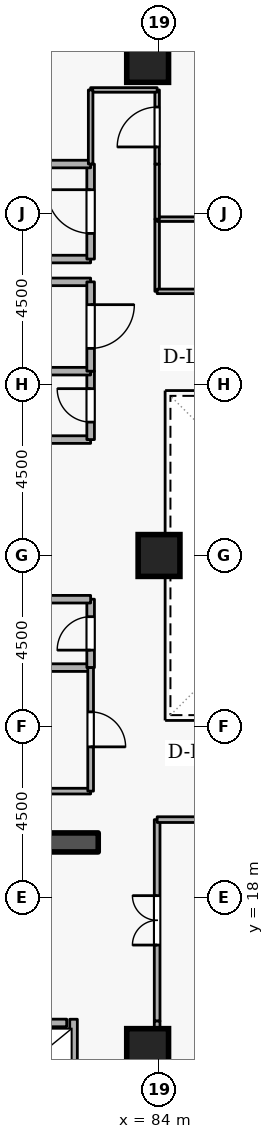
"""IFC4 building model, lengths in metres.
Left out: names, types, materials, properties, quantities, classifications, styles, units other than length and angle.
Written with IfcOpenShell. Run it as: python <this file> out.ifc"""

import sys

from ifc_helpers import new_model, si_unit, direction, frame, frame_2d, origin, origin_2d, place, context, subcontext, project, spatial, rectangle, extrude, element, fill, save


model = new_model("IFC4")
c1 = context("Model", 3, precision=1e-05, world=origin(), true_north=direction((0.0, 1.0)))
c2 = subcontext(c1, "Body", "Model", "MODEL_VIEW")
j1 = project(units=[si_unit("LENGTHUNIT", "METRE"), si_unit("PLANEANGLEUNIT", "RADIAN")], contexts=[c1])
p1 = place(None, origin())
s1 = spatial("IfcSite", under=j1, at=p1, CompositionType="ELEMENT")
p2 = place(p1, origin())
s2 = spatial("IfcBuilding", under=s1, at=p2, CompositionType="ELEMENT")
p3 = place(p2, frame((0.0, 0.0, 167.1)))
s3 = spatial("IfcBuildingStorey", under=s2, at=p3, CompositionType="ELEMENT", Elevation=167.1)
p4 = place(p3, frame((76.6, 19.45, 0.0), z_axis=(0.0, 0.0, 1.0), x_axis=(1.0, 0.0, 0.0)))
e1 = element("IfcWall", 1, at=p4, inside=s3, PredefinedType="SHEAR", context=c2, shape_type="SweptSolid", body=[
    extrude(rectangle(XDim=5.8, YDim=0.5, at=frame_2d((2.9, 0.0))), origin(), (0.0, 0.0, 1.0), 3.6),
])
for number, where, z_axis, x_axis in (
    (2, (83.7, 14.0, 0.0), (0.0, 0.0, 1.0), (1.0, 0.0, 0.0)),
    (3, (83.7, 40.0, 0.0), (0.0, 0.0, 1.0), (1.0, 0.0, 0.0)),
    (4, (84.0, 27.0, 0.0), (0.0, 0.0, 1.0), (1.0, 0.0, 0.0)),
):
    element("IfcColumn", number, at=place(p3, frame(where, z_axis=z_axis, x_axis=x_axis)), inside=s3, PredefinedType="COLUMN", context=c2, shape_type="SweptSolid", body=[
        extrude(rectangle(XDim=1.1, YDim=1.1, at=origin_2d()), origin(), (0.0, 0.0, 1.0), 3.6),
    ])
p5 = place(p3, frame((79.63, 14.7, 0.0), z_axis=(0.0, 0.0, 1.0), x_axis=(1.0, 0.0, 0.0)))
e5 = element("IfcWall", 5, at=p5, inside=s3, PredefinedType="STANDARD", context=c2, shape_type="SweptSolid", body=[
    extrude(rectangle(XDim=1.94, YDim=0.2, at=frame_2d((0.97, 0.0))), origin(), (0.0, 0.0, 1.0), 3.34),
])
p6 = place(p5, frame((0.46, 0.0, 0.0)))
e6 = element("IfcOpeningElement", 6, at=p6, cuts=e5, PredefinedType="OPENING", context=c2, shape_type="SweptSolid", body=[
    extrude(rectangle(XDim=1.02, YDim=2.06, at=frame_2d((0.51, 1.03))), frame((0.0, 0.11, 0.0), z_axis=(0.0, -1.0, 0.0), x_axis=(1.0, 0.0, 0.0)), (0.0, 0.0, 1.0), 0.22),
])
p7 = place(p3, frame((81.75, 12.612, 0.0), z_axis=(0.0, 0.0, 1.0), x_axis=(0.0, 1.0, 0.0)))
e7 = element("IfcWall", 7, at=p7, inside=s3, PredefinedType="STANDARD", context=c2, shape_type="SweptSolid", body=[
    extrude(rectangle(XDim=2.186, YDim=0.2, at=frame_2d((1.093, 0.0))), origin(), (0.0, 0.0, 1.0), 3.34),
])
p8 = place(p3, frame((79.9, 34.8, 0.0), z_axis=(0.0, 0.0, 1.0), x_axis=(1.0, 0.0, 0.0)))
e8 = element("IfcWall", 8, at=p8, inside=s3, PredefinedType="STANDARD", context=c2, shape_type="SweptSolid", body=[
    extrude(rectangle(XDim=2.3, YDim=0.2, at=frame_2d((1.15, 0.0))), origin(), (0.0, 0.0, 1.0), 2.545),
])
p9 = place(p3, frame((82.2, 34.8, 0.0), z_axis=(0.0, 0.0, 1.0), x_axis=(0.0, 1.0, 0.0)))
e9 = element("IfcWall", 9, at=p9, inside=s3, PredefinedType="STANDARD", context=c2, shape_type="SweptSolid", body=[
    extrude(rectangle(XDim=2.5, YDim=0.2, at=frame_2d((1.25, 0.0))), origin(), (0.0, 0.0, 1.0), 3.34),
])
p10 = place(p9, frame((0.675, 0.0, 0.0)))
e10 = element("IfcOpeningElement", 10, at=p10, cuts=e9, PredefinedType="OPENING", context=c2, shape_type="SweptSolid", body=[
    extrude(rectangle(XDim=1.15, YDim=2.1, at=frame_2d((0.575, 1.05))), frame((0.0, 0.11, 0.0), z_axis=(0.0, -1.0, 0.0), x_axis=(1.0, 0.0, 0.0)), (0.0, 0.0, 1.0), 0.22),
])
p11 = place(p3, frame((82.2, 37.3, 0.0), z_axis=(0.0, 0.0, 1.0), x_axis=(-1.0, 0.0, 0.0)))
e11 = element("IfcWall", 11, at=p11, inside=s3, PredefinedType="STANDARD", context=c2, shape_type="SweptSolid", body=[
    extrude(rectangle(XDim=5.7, YDim=0.2, at=frame_2d((2.85, 0.0))), origin(), (0.0, 0.0, 1.0), 3.34),
])
p12 = place(p3, frame((80.15, 24.05, 0.0), z_axis=(0.0, 0.0, 1.0), x_axis=(1.0, 0.0, 0.0)))
e12 = element("IfcWall", 12, at=p12, inside=s3, PredefinedType="STANDARD", context=c2, shape_type="SweptSolid", body=[
    extrude(rectangle(XDim=2.05, YDim=0.2, at=frame_2d((1.025, 0.0))), origin(), (0.0, 0.0, 1.0), 3.34),
])
p13 = place(p3, frame((82.2, 24.05, 0.0), z_axis=(0.0, 0.0, 1.0), x_axis=(0.0, 1.0, 0.0)))
e13 = element("IfcWall", 13, at=p13, inside=s3, PredefinedType="STANDARD", context=c2, shape_type="SweptSolid", body=[
    extrude(rectangle(XDim=1.8, YDim=0.2, at=frame_2d((0.9, 0.0))), origin(), (0.0, 0.0, 1.0), 3.34),
])
p14 = place(p13, frame((0.46, 0.0, 0.0)))
e14 = element("IfcOpeningElement", 14, at=p14, cuts=e13, PredefinedType="OPENING", context=c2, shape_type="SweptSolid", body=[
    extrude(rectangle(XDim=0.88, YDim=2.04, at=frame_2d((0.44, 1.02))), frame((0.0, 0.11, 0.0), z_axis=(0.0, -1.0, 0.0), x_axis=(1.0, 0.0, 0.0)), (0.0, 0.0, 1.0), 0.22),
])
for number, where, z_axis, x_axis in (
    (15, (82.2, 25.85, 0.0), (0.0, 0.0, 1.0), (-1.0, 0.0, 0.0)),
    (16, (80.15, 30.05, 0.0), (0.0, 0.0, 1.0), (1.0, 0.0, 0.0)),
):
    element("IfcWall", number, at=place(p3, frame(where, z_axis=z_axis, x_axis=x_axis)), inside=s3, PredefinedType="STANDARD", context=c2, shape_type="SweptSolid", body=[
        extrude(rectangle(XDim=2.05, YDim=0.2, at=frame_2d((1.025, 0.0))), origin(), (0.0, 0.0, 1.0), 3.34),
    ])
p15 = place(p3, frame((82.2, 30.05, 0.0), z_axis=(0.0, 0.0, 1.0), x_axis=(0.0, 1.0, 0.0)))
e17 = element("IfcWall", 17, at=p15, inside=s3, PredefinedType="STANDARD", context=c2, shape_type="SweptSolid", body=[
    extrude(rectangle(XDim=1.8, YDim=0.2, at=frame_2d((0.9, 0.0))), origin(), (0.0, 0.0, 1.0), 3.34),
])
p16 = place(p15, frame((0.46, 0.0, 0.0)))
e18 = element("IfcOpeningElement", 18, at=p16, cuts=e17, PredefinedType="OPENING", context=c2, shape_type="SweptSolid", body=[
    extrude(rectangle(XDim=0.88, YDim=2.04, at=frame_2d((0.44, 1.02))), frame((0.0, 0.11, 0.0), z_axis=(0.0, -1.0, 0.0), x_axis=(1.0, 0.0, 0.0)), (0.0, 0.0, 1.0), 0.22),
])
p17 = place(p3, frame((82.2, 31.85, 0.0), z_axis=(0.0, 0.0, 1.0), x_axis=(-1.0, 0.0, 0.0)))
e19 = element("IfcWall", 19, at=p17, inside=s3, PredefinedType="STANDARD", context=c2, shape_type="SweptSolid", body=[
    extrude(rectangle(XDim=2.05, YDim=0.2, at=frame_2d((1.025, 0.0))), origin(), (0.0, 0.0, 1.0), 3.34),
])
p18 = place(p3, frame((80.15, 34.2, 0.0), z_axis=(0.0, 0.0, 1.0), x_axis=(1.0, 0.0, 0.0)))
e20 = element("IfcWall", 20, at=p18, inside=s3, PredefinedType="STANDARD", context=c2, shape_type="SweptSolid", body=[
    extrude(rectangle(XDim=2.05, YDim=0.2, at=frame_2d((1.025, 0.0))), origin(), (0.0, 0.0, 1.0), 2.545),
])
p19 = place(p3, frame((82.2, 34.2, 0.0), z_axis=(0.0, 0.0, 1.0), x_axis=(0.0, -1.0, 0.0)))
e21 = element("IfcWall", 21, at=p19, inside=s3, PredefinedType="STANDARD", context=c2, shape_type="SweptSolid", body=[
    extrude(rectangle(XDim=2.35, YDim=0.2, at=frame_2d((1.175, 0.0))), origin(), (0.0, 0.0, 1.0), 3.34),
])
p20 = place(p19, frame((0.6, 0.0, 0.0)))
e22 = element("IfcOpeningElement", 22, at=p20, cuts=e21, PredefinedType="OPENING", context=c2, shape_type="SweptSolid", body=[
    extrude(rectangle(XDim=1.15, YDim=2.1, at=frame_2d((0.575, 1.05))), frame((0.0, 0.11, 0.0), z_axis=(0.0, -1.0, 0.0), x_axis=(1.0, 0.0, 0.0)), (0.0, 0.0, 1.0), 0.22),
])
p21 = place(p3, frame((82.2, 20.8, 0.0), z_axis=(0.0, 0.0, 1.0), x_axis=(-1.0, 0.0, 0.0)))
e23 = element("IfcWall", 23, at=p21, inside=s3, PredefinedType="PARTITIONING", context=c2, shape_type="SweptSolid", body=[
    extrude(rectangle(XDim=2.05, YDim=0.15, at=frame_2d((1.025, 0.0))), origin(), (0.0, 0.0, 1.0), 3.34),
])
p22 = place(p3, frame((82.2, 24.05, 0.0), z_axis=(0.0, 0.0, 1.0), x_axis=(0.0, -1.0, 0.0)))
e24 = element("IfcWall", 24, at=p22, inside=s3, PredefinedType="PARTITIONING", context=c2, shape_type="SweptSolid", body=[
    extrude(rectangle(XDim=3.25, YDim=0.15, at=frame_2d((1.625, 0.0))), origin(), (0.0, 0.0, 1.0), 3.34),
])
p23 = place(p22, frame((1.165, 0.0, 0.0)))
e25 = element("IfcOpeningElement", 25, at=p23, cuts=e24, PredefinedType="OPENING", context=c2, shape_type="SweptSolid", body=[
    extrude(rectangle(XDim=0.92, YDim=2.08, at=frame_2d((0.46, 1.04))), frame((0.0, 0.085, 0.0), z_axis=(0.0, -1.0, 0.0), x_axis=(1.0, 0.0, 0.0)), (0.0, 0.0, 1.0), 0.17),
])
p24 = place(p3, frame((83.95, 14.75, 0.0), z_axis=(0.0, 0.0, 1.0), x_axis=(0.0, 1.0, 0.0)))
e26 = element("IfcWall", 26, at=p24, inside=s3, PredefinedType="PARTITIONING", context=c2, shape_type="SweptSolid", body=[
    extrude(rectangle(XDim=5.3, YDim=0.15, at=frame_2d((2.65, 0.0))), origin(), (0.0, 0.0, 1.0), 3.34),
])
p25 = place(p24, frame((2.0, 0.0, 0.0)))
e27 = element("IfcOpeningElement", 27, at=p25, cuts=e26, PredefinedType="OPENING", context=c2, shape_type="SweptSolid", body=[
    extrude(rectangle(XDim=1.3, YDim=2.12, at=frame_2d((0.65, 1.06))), frame((0.0, 0.085, 0.0), z_axis=(0.0, -1.0, 0.0), x_axis=(1.0, 0.0, 0.0)), (0.0, 0.0, 1.0), 0.17),
])
p26 = place(p3, frame((83.95, 20.05, 0.0), z_axis=(0.0, 0.0, 1.0), x_axis=(1.0, 0.0, 0.0)))
e28 = element("IfcWall", 28, at=p26, inside=s3, PredefinedType="PARTITIONING", context=c2, shape_type="SweptSolid", body=[
    extrude(rectangle(XDim=2.25, YDim=0.15, at=frame_2d((1.125, 0.0))), origin(), (0.0, 0.0, 1.0), 3.34),
])
p27 = place(p3, frame((83.95, 12.4, 0.0), z_axis=(0.0, 0.0, 1.0), x_axis=(0.0, 1.0, 0.0)))
e29 = element("IfcWall", 29, at=p27, inside=s3, PredefinedType="PARTITIONING", context=c2, shape_type="SweptSolid", body=[
    extrude(rectangle(XDim=2.35, YDim=0.15, at=frame_2d((1.175, 0.0))), origin(), (0.0, 0.0, 1.0), 3.34),
])
p28 = place(p3, frame((83.95, 33.95, 0.0), z_axis=(0.0, 0.0, 1.0), x_axis=(0.0, 1.0, 0.0)))
e30 = element("IfcWall", 30, at=p28, inside=s3, PredefinedType="PARTITIONING", context=c2, shape_type="SweptSolid", body=[
    extrude(rectangle(XDim=1.9, YDim=0.12, at=frame_2d((0.95, 0.0))), origin(), (0.0, 0.0, 1.0), 3.34),
])
p29 = place(p3, frame((83.95, 35.85, 0.0), z_axis=(0.0, 0.0, 1.0), x_axis=(1.0, 0.0, 0.0)))
e31 = element("IfcWall", 31, at=p29, inside=s3, PredefinedType="PARTITIONING", context=c2, shape_type="SweptSolid", body=[
    extrude(rectangle(XDim=4.55, YDim=0.12, at=frame_2d((2.275, 0.0))), origin(), (0.0, 0.0, 1.0), 3.34),
])
p30 = place(p3, frame((88.5, 33.95, 0.0), z_axis=(0.0, 0.0, 1.0), x_axis=(-1.0, 0.0, 0.0)))
e32 = element("IfcWall", 32, at=p30, inside=s3, PredefinedType="PARTITIONING", context=c2, shape_type="SweptSolid", body=[
    extrude(rectangle(XDim=4.55, YDim=0.12, at=frame_2d((2.275, 0.0))), origin(), (0.0, 0.0, 1.0), 3.34),
])
p31 = place(p30, frame((1.8, 0.0, 0.0)))
e33 = element("IfcOpeningElement", 33, at=p31, cuts=e32, PredefinedType="OPENING", context=c2, shape_type="SweptSolid", body=[
    extrude(rectangle(XDim=0.95, YDim=2.1, at=frame_2d((0.475, 1.05))), frame((0.0, 0.07, 0.0), z_axis=(0.0, -1.0, 0.0), x_axis=(1.0, 0.0, 0.0)), (0.0, 0.0, 1.0), 0.14),
])
p32 = place(p3, frame((83.95, 35.85, 0.0), z_axis=(0.0, 0.0, 1.0), x_axis=(0.0, 1.0, 0.0)))
e34 = element("IfcWall", 34, at=p32, inside=s3, PredefinedType="PARTITIONING", context=c2, shape_type="SweptSolid", body=[
    extrude(rectangle(XDim=1.45, YDim=0.12, at=frame_2d((0.725, 0.0))), origin(), (0.0, 0.0, 1.0), 3.34),
])
p33 = place(p3, frame((83.95, 37.3, 0.0), z_axis=(0.0, 0.0, 1.0), x_axis=(0.0, 1.0, 0.0)))
e35 = element("IfcWall", 35, at=p33, inside=s3, PredefinedType="PARTITIONING", context=c2, shape_type="SweptSolid", body=[
    extrude(rectangle(XDim=1.95, YDim=0.12, at=frame_2d((0.975, 0.0))), origin(), (0.0, 0.0, 1.0), 3.34),
])
p34 = place(p33, frame((0.45, 0.0, 0.0)))
e36 = element("IfcOpeningElement", 36, at=p34, cuts=e35, PredefinedType="OPENING", context=c2, shape_type="SweptSolid", body=[
    extrude(rectangle(XDim=1.05, YDim=2.1, at=frame_2d((0.525, 1.05))), frame((0.0, 0.07, 0.0), z_axis=(0.0, -1.0, 0.0), x_axis=(1.0, 0.0, 0.0)), (0.0, 0.0, 1.0), 0.14),
])
p35 = place(p3, frame((83.95, 39.25, 0.0), z_axis=(0.0, 0.0, 1.0), x_axis=(-1.0, 0.0, 0.0)))
e37 = element("IfcWall", 37, at=p35, inside=s3, PredefinedType="PARTITIONING", context=c2, shape_type="SweptSolid", body=[
    extrude(rectangle(XDim=1.75, YDim=0.12, at=frame_2d((0.875, 0.0))), origin(), (0.0, 0.0, 1.0), 3.34),
])
p36 = place(p3, frame((82.2, 39.25, 0.0), z_axis=(0.0, 0.0, 1.0), x_axis=(0.0, -1.0, 0.0)))
e38 = element("IfcWall", 38, at=p36, inside=s3, PredefinedType="PARTITIONING", context=c2, shape_type="SweptSolid", body=[
    extrude(rectangle(XDim=1.95, YDim=0.12, at=frame_2d((0.975, 0.0))), origin(), (0.0, 0.0, 1.0), 3.34),
])
p37 = place(p10, origin())
e39 = element("IfcDoor", 39, at=p37, inside=s3, OperationType="SINGLE_SWING_RIGHT", PredefinedType="DOOR", context=c2, shape_type="SweptSolid", body=[
    extrude(rectangle(XDim=1.15, YDim=2.1, at=frame_2d((0.575, 1.05))), frame((0.0, 0.025, 0.0), z_axis=(0.0, -1.0, 0.0), x_axis=(1.0, 0.0, 0.0)), (0.0, 0.0, 1.0), 0.05),
])
fill(e10, e39)
p38 = place(p14, origin())
e40 = element("IfcDoor", 40, at=p38, inside=s3, OperationType="SINGLE_SWING_LEFT", PredefinedType="DOOR", context=c2, shape_type="SweptSolid", body=[
    extrude(rectangle(XDim=0.88, YDim=2.04, at=frame_2d((0.44, 1.02))), frame((0.0, 0.025, 0.0), z_axis=(0.0, -1.0, 0.0), x_axis=(1.0, 0.0, 0.0)), (0.0, 0.0, 1.0), 0.05),
])
fill(e14, e40)
p39 = place(p16, origin())
e41 = element("IfcDoor", 41, at=p39, inside=s3, OperationType="SINGLE_SWING_RIGHT", PredefinedType="DOOR", context=c2, shape_type="SweptSolid", body=[
    extrude(rectangle(XDim=0.88, YDim=2.04, at=frame_2d((0.44, 1.02))), frame((0.0, 0.025, 0.0), z_axis=(0.0, -1.0, 0.0), x_axis=(1.0, 0.0, 0.0)), (0.0, 0.0, 1.0), 0.05),
])
fill(e18, e41)
p40 = place(p23, origin())
e42 = element("IfcDoor", 42, at=p40, inside=s3, OperationType="SINGLE_SWING_RIGHT", PredefinedType="DOOR", context=c2, shape_type="SweptSolid", body=[
    extrude(rectangle(XDim=0.92, YDim=2.08, at=frame_2d((0.46, 1.04))), frame((0.0, 0.025, 0.0), z_axis=(0.0, -1.0, 0.0), x_axis=(1.0, 0.0, 0.0)), (0.0, 0.0, 1.0), 0.05),
])
fill(e25, e42)
p41 = place(p20, origin())
e43 = element("IfcDoor", 43, at=p41, inside=s3, OperationType="SINGLE_SWING_LEFT", PredefinedType="DOOR", context=c2, shape_type="SweptSolid", body=[
    extrude(rectangle(XDim=1.15, YDim=2.1, at=frame_2d((0.575, 1.05))), frame((0.0, 0.025, 0.0), z_axis=(0.0, -1.0, 0.0), x_axis=(1.0, 0.0, 0.0)), (0.0, 0.0, 1.0), 0.05),
])
fill(e22, e43)
p42 = place(p25, origin())
e44 = element("IfcDoor", 44, at=p42, inside=s3, OperationType="DOUBLE_DOOR_SINGLE_SWING", PredefinedType="DOOR", context=c2, shape_type="SweptSolid", body=[
    extrude(rectangle(XDim=1.3, YDim=2.12, at=frame_2d((0.65, 1.06))), frame((0.0, 0.025, 0.0), z_axis=(0.0, -1.0, 0.0), x_axis=(1.0, 0.0, 0.0)), (0.0, 0.0, 1.0), 0.05),
])
fill(e27, e44)
p43 = place(p34, origin())
e45 = element("IfcDoor", 45, at=p43, inside=s3, OperationType="SINGLE_SWING_LEFT", PredefinedType="DOOR", context=c2, shape_type="SweptSolid", body=[
    extrude(rectangle(XDim=1.05, YDim=2.1, at=frame_2d((0.525, 1.05))), frame((0.0, 0.025, 0.0), z_axis=(0.0, -1.0, 0.0), x_axis=(1.0, 0.0, 0.0)), (0.0, 0.0, 1.0), 0.05),
])
fill(e36, e45)
save(model, sys.argv[1])
